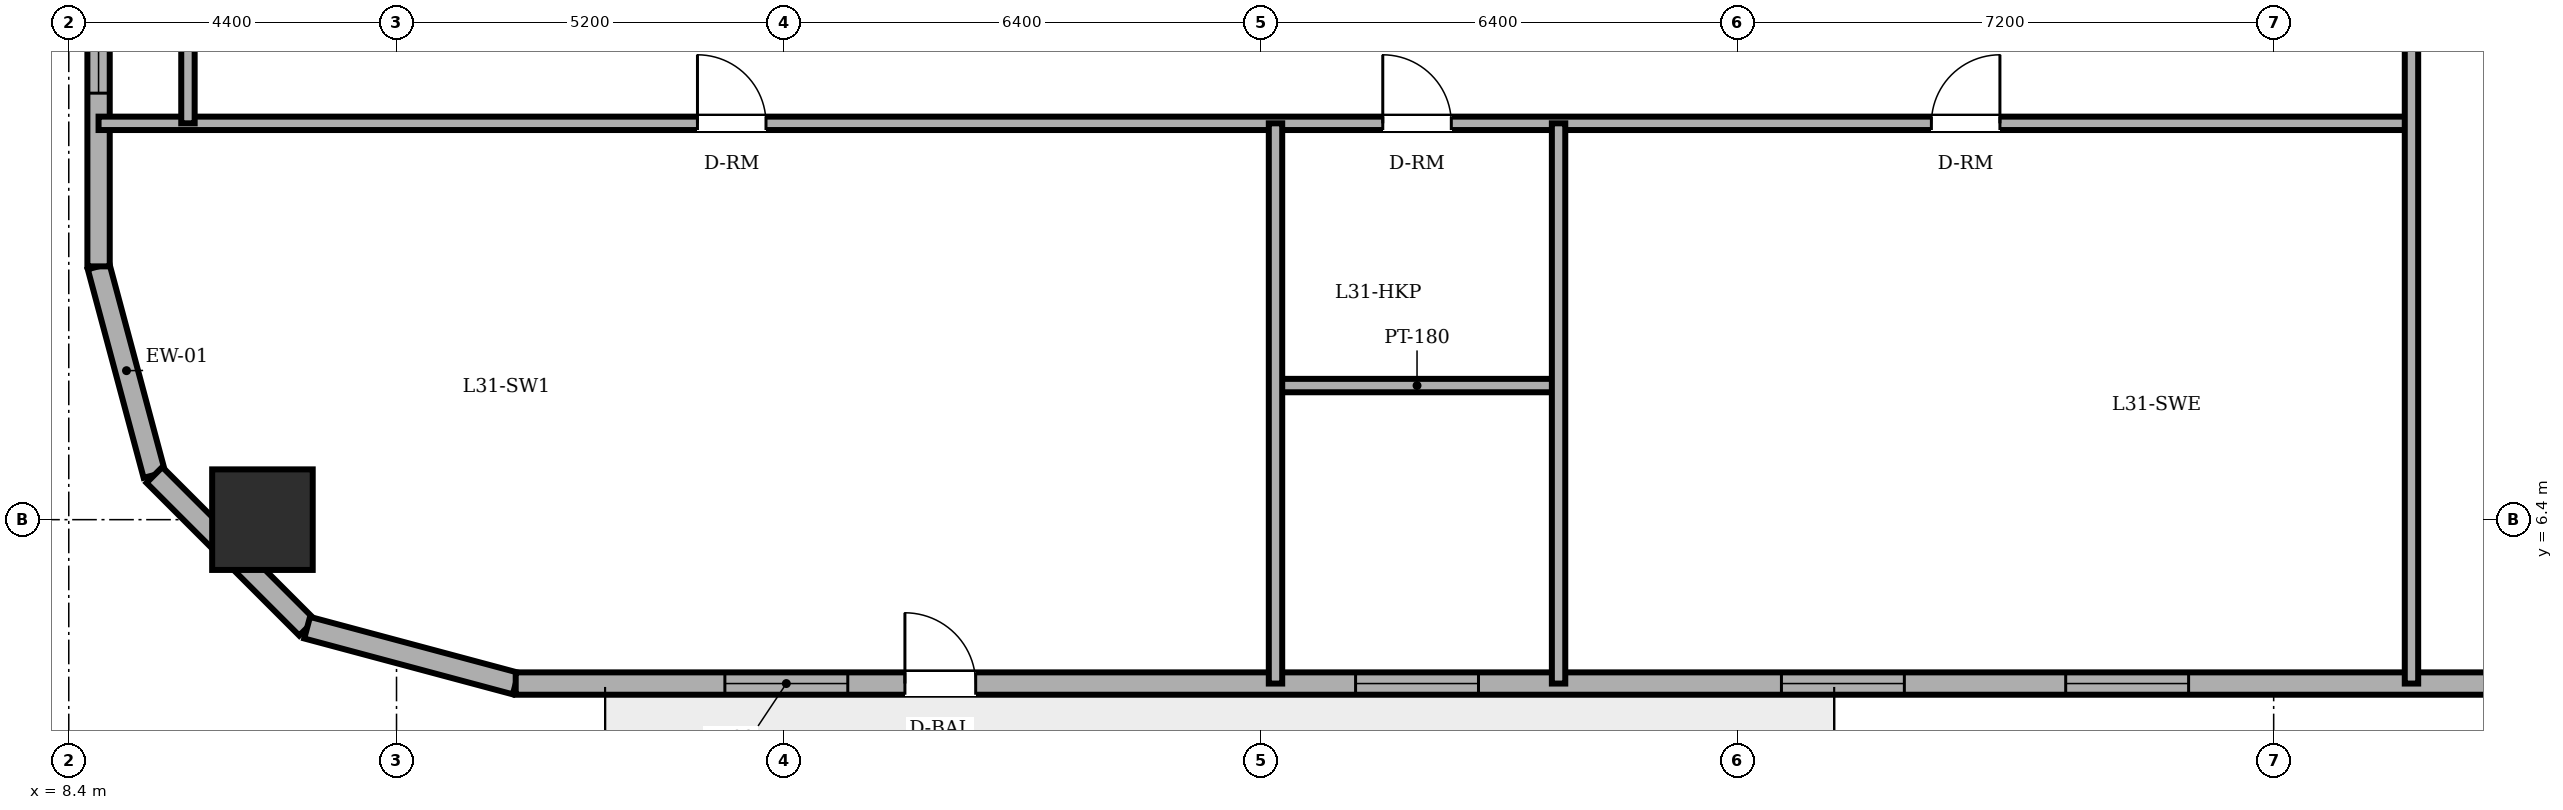
"""IFC4 building model, lengths in metres.
Left out: names, types, materials, properties, quantities, classifications, styles, units other than length and angle.
Written with IfcOpenShell. Run it as: python <this file> out.ifc"""

import sys

from ifc_helpers import new_model, si_unit, direction, frame, frame_2d, origin, origin_2d, place, context, subcontext, project, spatial, rectangle, circle, extrude, element, fill, save


model = new_model("IFC4")
c1 = context("Model", 3, precision=1e-05, world=origin(), true_north=direction((0.0, 1.0)))
c2 = subcontext(c1, "Body", "Model", "MODEL_VIEW")
j1 = project(units=[si_unit("LENGTHUNIT", "METRE"), si_unit("PLANEANGLEUNIT", "RADIAN")], contexts=[c1])
p1 = place(None, origin())
s1 = spatial("IfcSite", under=j1, at=p1, CompositionType="ELEMENT")
p2 = place(p1, origin())
s2 = spatial("IfcBuilding", under=s1, at=p2, CompositionType="ELEMENT")
p3 = place(p2, frame((0.0, 0.0, 118.7)))
s3 = spatial("IfcBuildingStorey", under=s2, at=p3, CompositionType="ELEMENT", Elevation=118.7)
p4 = place(p3, frame((11.0, 6.4, 0.0), z_axis=(0.0, 0.0, 1.0), x_axis=(1.0, 0.0, 0.0)))
e1 = element("IfcColumn", 1, at=p4, inside=s3, PredefinedType="COLUMN", context=c2, shape_type="SweptSolid", body=[
    extrude(circle(Radius=0.675, at=origin_2d()), origin(), (0.0, 0.0, 1.0), 3.6),
])
p5 = place(p3, frame((8.8, 9.8, 0.0), z_axis=(0.0, 0.0, 1.0), x_axis=(0.258731875344, -0.96594917914, 0.0)))
e2 = element("IfcWall", 2, at=p5, inside=s3, PredefinedType="SOLIDWALL", context=c2, shape_type="SweptSolid", body=[
    extrude(rectangle(XDim=2.899, YDim=0.3, at=frame_2d((1.449, 0.0))), origin(), (0.0, 0.0, 1.0), 3.4),
])
p6 = place(p3, frame((9.55, 7.0, 0.0), z_axis=(0.0, 0.0, 1.0), x_axis=(0.707106781187, -0.707106781187, 0.0)))
e3 = element("IfcWall", 3, at=p6, inside=s3, PredefinedType="SOLIDWALL", context=c2, shape_type="SweptSolid", body=[
    extrude(rectangle(XDim=2.899, YDim=0.3, at=frame_2d((1.45, 0.0))), origin(), (0.0, 0.0, 1.0), 3.4),
])
p7 = place(p3, frame((11.6, 4.95, 0.0), z_axis=(0.0, 0.0, 1.0), x_axis=(0.965943540406, -0.258752926066, 0.0)))
e4 = element("IfcWall", 4, at=p7, inside=s3, PredefinedType="SOLIDWALL", context=c2, shape_type="SweptSolid", body=[
    extrude(rectangle(XDim=2.898, YDim=0.3, at=frame_2d((1.449, 0.0))), origin(), (0.0, 0.0, 1.0), 3.4),
])
p8 = place(p3, frame((14.4, 4.2, 0.0), z_axis=(0.0, 0.0, 1.0), x_axis=(1.0, 0.0, 0.0)))
e5 = element("IfcWall", 5, at=p8, inside=s3, PredefinedType="SOLIDWALL", context=c2, shape_type="SweptSolid", body=[
    extrude(rectangle(XDim=29.933, YDim=0.3, at=frame_2d((14.967, 0.0))), origin(), (0.0, 0.0, 1.0), 3.4),
])
p9 = place(p8, frame((5.225, 0.0, 0.0)))
e6 = element("IfcOpeningElement", 6, at=p9, cuts=e5, PredefinedType="OPENING", context=c2, shape_type="SweptSolid", body=[
    extrude(rectangle(XDim=0.95, YDim=2.2, at=frame_2d((0.475, 1.1))), frame((0.0, 0.16, 0.0), z_axis=(0.0, -1.0, 0.0), x_axis=(1.0, 0.0, 0.0)), (0.0, 0.0, 1.0), 0.32),
])
p10 = place(p8, frame((2.808, 0.0, 0.85)))
e7 = element("IfcOpeningElement", 7, at=p10, cuts=e5, PredefinedType="OPENING", context=c2, shape_type="SweptSolid", body=[
    extrude(rectangle(XDim=1.65, YDim=1.55, at=frame_2d((0.825, 0.775))), frame((0.0, 0.16, 0.0), z_axis=(0.0, -1.0, 0.0), x_axis=(1.0, 0.0, 0.0)), (0.0, 0.0, 1.0), 0.32),
])
p11 = place(p8, frame((11.275, 0.0, 0.85)))
e8 = element("IfcOpeningElement", 8, at=p11, cuts=e5, PredefinedType="OPENING", context=c2, shape_type="SweptSolid", body=[
    extrude(rectangle(XDim=1.65, YDim=1.55, at=frame_2d((0.825, 0.775))), frame((0.0, 0.16, 0.0), z_axis=(0.0, -1.0, 0.0), x_axis=(1.0, 0.0, 0.0)), (0.0, 0.0, 1.0), 0.32),
])
p12 = place(p8, frame((16.992, 0.0, 0.85)))
e9 = element("IfcOpeningElement", 9, at=p12, cuts=e5, PredefinedType="OPENING", context=c2, shape_type="SweptSolid", body=[
    extrude(rectangle(XDim=1.65, YDim=1.55, at=frame_2d((0.825, 0.775))), frame((0.0, 0.16, 0.0), z_axis=(0.0, -1.0, 0.0), x_axis=(1.0, 0.0, 0.0)), (0.0, 0.0, 1.0), 0.32),
])
p13 = place(p8, frame((20.808, 0.0, 0.85)))
e10 = element("IfcOpeningElement", 10, at=p13, cuts=e5, PredefinedType="OPENING", context=c2, shape_type="SweptSolid", body=[
    extrude(rectangle(XDim=1.65, YDim=1.55, at=frame_2d((0.825, 0.775))), frame((0.0, 0.16, 0.0), z_axis=(0.0, -1.0, 0.0), x_axis=(1.0, 0.0, 0.0)), (0.0, 0.0, 1.0), 0.32),
])
p14 = place(p8, frame((26.692, 0.0, 0.85)))
e11 = element("IfcOpeningElement", 11, at=p14, cuts=e5, PredefinedType="OPENING", context=c2, shape_type="SweptSolid", body=[
    extrude(rectangle(XDim=1.65, YDim=1.55, at=frame_2d((0.825, 0.775))), frame((0.0, 0.16, 0.0), z_axis=(0.0, -1.0, 0.0), x_axis=(1.0, 0.0, 0.0)), (0.0, 0.0, 1.0), 0.32),
])
p15 = place(p3, frame((8.8, 38.2, 0.0), z_axis=(0.0, 0.0, 1.0), x_axis=(0.0, -1.0, 0.0)))
e12 = element("IfcWall", 12, at=p15, inside=s3, PredefinedType="SOLIDWALL", context=c2, shape_type="SweptSolid", body=[
    extrude(rectangle(XDim=28.4, YDim=0.3, at=frame_2d((14.2, 0.0))), origin(), (0.0, 0.0, 1.0), 3.4),
])
p16 = place(p15, frame((2.325, 0.0, 0.85)))
e13 = element("IfcOpeningElement", 13, at=p16, cuts=e12, PredefinedType="OPENING", context=c2, shape_type="SweptSolid", body=[
    extrude(rectangle(XDim=1.65, YDim=1.55, at=frame_2d((0.825, 0.775))), frame((0.0, 0.16, 0.0), z_axis=(0.0, -1.0, 0.0), x_axis=(1.0, 0.0, 0.0)), (0.0, 0.0, 1.0), 0.32),
])
p17 = place(p15, frame((6.828, 0.0, 0.85)))
e14 = element("IfcOpeningElement", 14, at=p17, cuts=e12, PredefinedType="OPENING", context=c2, shape_type="SweptSolid", body=[
    extrude(rectangle(XDim=1.65, YDim=1.55, at=frame_2d((0.825, 0.775))), frame((0.0, 0.16, 0.0), z_axis=(0.0, -1.0, 0.0), x_axis=(1.0, 0.0, 0.0)), (0.0, 0.0, 1.0), 0.32),
])
p18 = place(p15, frame((10.102, 0.0, 0.85)))
e15 = element("IfcOpeningElement", 15, at=p18, cuts=e12, PredefinedType="OPENING", context=c2, shape_type="SweptSolid", body=[
    extrude(rectangle(XDim=1.65, YDim=1.55, at=frame_2d((0.825, 0.775))), frame((0.0, 0.16, 0.0), z_axis=(0.0, -1.0, 0.0), x_axis=(1.0, 0.0, 0.0)), (0.0, 0.0, 1.0), 0.32),
])
p19 = place(p15, frame((16.648, 0.0, 0.85)))
e16 = element("IfcOpeningElement", 16, at=p19, cuts=e12, PredefinedType="OPENING", context=c2, shape_type="SweptSolid", body=[
    extrude(rectangle(XDim=1.65, YDim=1.55, at=frame_2d((0.825, 0.775))), frame((0.0, 0.16, 0.0), z_axis=(0.0, -1.0, 0.0), x_axis=(1.0, 0.0, 0.0)), (0.0, 0.0, 1.0), 0.32),
])
p20 = place(p15, frame((19.922, 0.0, 0.85)))
e17 = element("IfcOpeningElement", 17, at=p20, cuts=e12, PredefinedType="OPENING", context=c2, shape_type="SweptSolid", body=[
    extrude(rectangle(XDim=1.65, YDim=1.55, at=frame_2d((0.825, 0.775))), frame((0.0, 0.16, 0.0), z_axis=(0.0, -1.0, 0.0), x_axis=(1.0, 0.0, 0.0)), (0.0, 0.0, 1.0), 0.32),
])
p21 = place(p15, frame((24.425, 0.0, 0.85)))
e18 = element("IfcOpeningElement", 18, at=p21, cuts=e12, PredefinedType="OPENING", context=c2, shape_type="SweptSolid", body=[
    extrude(rectangle(XDim=1.65, YDim=1.55, at=frame_2d((0.825, 0.775))), frame((0.0, 0.16, 0.0), z_axis=(0.0, -1.0, 0.0), x_axis=(1.0, 0.0, 0.0)), (0.0, 0.0, 1.0), 0.32),
])
p22 = place(p3, frame((24.6, 8.2, 0.0), z_axis=(0.0, 0.0, 1.0), x_axis=(1.0, 0.0, 0.0)))
e19 = element("IfcWall", 19, at=p22, inside=s3, PredefinedType="PARTITIONING", context=c2, shape_type="SweptSolid", body=[
    extrude(rectangle(XDim=3.8, YDim=0.18, at=frame_2d((1.9, 0.0))), origin(), (0.0, 0.0, 1.0), 3.4),
])
p23 = place(p3, frame((8.8, 11.72, 0.0), z_axis=(0.0, 0.0, 1.0), x_axis=(1.0, 0.0, 0.0)))
e20 = element("IfcWall", 20, at=p23, inside=s3, PredefinedType="PARTITIONING", context=c2, shape_type="SweptSolid", body=[
    extrude(rectangle(XDim=31.05, YDim=0.18, at=frame_2d((15.525, 0.0))), origin(), (0.0, 0.0, 1.0), 3.4),
])
p24 = place(p23, frame((17.24, 0.0, 0.0)))
e21 = element("IfcOpeningElement", 21, at=p24, cuts=e20, PredefinedType="OPENING", context=c2, shape_type="SweptSolid", body=[
    extrude(rectangle(XDim=0.92, YDim=2.1, at=frame_2d((0.46, 1.05))), frame((0.0, 0.1, 0.0), z_axis=(0.0, -1.0, 0.0), x_axis=(1.0, 0.0, 0.0)), (0.0, 0.0, 1.0), 0.2),
])
p25 = place(p23, frame((8.04, 0.0, 0.0)))
e22 = element("IfcOpeningElement", 22, at=p25, cuts=e20, PredefinedType="OPENING", context=c2, shape_type="SweptSolid", body=[
    extrude(rectangle(XDim=0.92, YDim=2.1, at=frame_2d((0.46, 1.05))), frame((0.0, 0.1, 0.0), z_axis=(0.0, -1.0, 0.0), x_axis=(1.0, 0.0, 0.0)), (0.0, 0.0, 1.0), 0.2),
])
p26 = place(p23, frame((24.605, 0.0, 0.0)))
e23 = element("IfcOpeningElement", 23, at=p26, cuts=e20, PredefinedType="OPENING", context=c2, shape_type="SweptSolid", body=[
    extrude(rectangle(XDim=0.92, YDim=2.1, at=frame_2d((0.46, 1.05))), frame((0.0, 0.1, 0.0), z_axis=(0.0, -1.0, 0.0), x_axis=(1.0, 0.0, 0.0)), (0.0, 0.0, 1.0), 0.2),
])
p27 = place(p3, frame((10.0, 11.72, 0.0), z_axis=(0.0, 0.0, 1.0), x_axis=(0.0, 1.0, 0.0)))
e24 = element("IfcWall", 24, at=p27, inside=s3, PredefinedType="PARTITIONING", context=c2, shape_type="SweptSolid", body=[
    extrude(rectangle(XDim=2.46, YDim=0.18, at=frame_2d((1.23, 0.0))), origin(), (0.0, 0.0, 1.0), 3.4),
])
for number, where, z_axis, x_axis in (
    (25, (24.6, 4.2, 0.0), (0.0, 0.0, 1.0), (0.0, 1.0, 0.0)),
    (26, (28.4, 4.2, 0.0), (0.0, 0.0, 1.0), (0.0, 1.0, 0.0)),
):
    element("IfcWall", number, at=place(p3, frame(where, z_axis=z_axis, x_axis=x_axis)), inside=s3, PredefinedType="PARTITIONING", context=c2, shape_type="SweptSolid", body=[
        extrude(rectangle(XDim=7.52, YDim=0.18, at=frame_2d((3.76, 0.0))), origin(), (0.0, 0.0, 1.0), 3.4),
    ])
p28 = place(p3, frame((39.85, 4.2, 0.0), z_axis=(0.0, 0.0, 1.0), x_axis=(0.0, 1.0, 0.0)))
e27 = element("IfcWall", 27, at=p28, inside=s3, PredefinedType="PARTITIONING", context=c2, shape_type="SweptSolid", body=[
    extrude(rectangle(XDim=18.62, YDim=0.18, at=frame_2d((9.31, 0.0))), origin(), (0.0, 0.0, 1.0), 3.4),
])
p29 = place(p28, frame((12.35, 0.0, 0.0)))
e28 = element("IfcOpeningElement", 28, at=p29, cuts=e27, PredefinedType="OPENING", context=c2, shape_type="SweptSolid", body=[
    extrude(rectangle(XDim=0.92, YDim=2.1, at=frame_2d((0.46, 1.05))), frame((0.0, 0.1, 0.0), z_axis=(0.0, -1.0, 0.0), x_axis=(1.0, 0.0, 0.0)), (0.0, 0.0, 1.0), 0.2),
])
p30 = place(p9, origin())
e29 = element("IfcDoor", 29, at=p30, inside=s3, OperationType="SINGLE_SWING_LEFT", PredefinedType="DOOR", context=c2, shape_type="SweptSolid", body=[
    extrude(rectangle(XDim=0.95, YDim=2.2, at=frame_2d((0.475, 1.1))), frame((0.0, 0.025, 0.0), z_axis=(0.0, -1.0, 0.0), x_axis=(1.0, 0.0, 0.0)), (0.0, 0.0, 1.0), 0.05),
])
fill(e6, e29)
p31 = place(p10, origin())
e30 = element("IfcWindow", 30, at=p31, inside=s3, PartitioningType="DOUBLE_PANEL_VERTICAL", PredefinedType="WINDOW", context=c2, shape_type="SweptSolid", body=[
    extrude(rectangle(XDim=1.65, YDim=1.55, at=frame_2d((0.825, 0.775))), frame((0.0, 0.03, 0.0), z_axis=(0.0, -1.0, 0.0), x_axis=(1.0, 0.0, 0.0)), (0.0, 0.0, 1.0), 0.06),
])
fill(e7, e30)
p32 = place(p11, origin())
e31 = element("IfcWindow", 31, at=p32, inside=s3, PartitioningType="DOUBLE_PANEL_VERTICAL", PredefinedType="WINDOW", context=c2, shape_type="SweptSolid", body=[
    extrude(rectangle(XDim=1.65, YDim=1.55, at=frame_2d((0.825, 0.775))), frame((0.0, 0.03, 0.0), z_axis=(0.0, -1.0, 0.0), x_axis=(1.0, 0.0, 0.0)), (0.0, 0.0, 1.0), 0.06),
])
fill(e8, e31)
p33 = place(p12, origin())
e32 = element("IfcWindow", 32, at=p33, inside=s3, PartitioningType="DOUBLE_PANEL_VERTICAL", PredefinedType="WINDOW", context=c2, shape_type="SweptSolid", body=[
    extrude(rectangle(XDim=1.65, YDim=1.55, at=frame_2d((0.825, 0.775))), frame((0.0, 0.03, 0.0), z_axis=(0.0, -1.0, 0.0), x_axis=(1.0, 0.0, 0.0)), (0.0, 0.0, 1.0), 0.06),
])
fill(e9, e32)
p34 = place(p13, origin())
e33 = element("IfcWindow", 33, at=p34, inside=s3, PartitioningType="DOUBLE_PANEL_VERTICAL", PredefinedType="WINDOW", context=c2, shape_type="SweptSolid", body=[
    extrude(rectangle(XDim=1.65, YDim=1.55, at=frame_2d((0.825, 0.775))), frame((0.0, 0.03, 0.0), z_axis=(0.0, -1.0, 0.0), x_axis=(1.0, 0.0, 0.0)), (0.0, 0.0, 1.0), 0.06),
])
fill(e10, e33)
p35 = place(p21, origin())
e34 = element("IfcWindow", 34, at=p35, inside=s3, PartitioningType="DOUBLE_PANEL_VERTICAL", PredefinedType="WINDOW", context=c2, shape_type="SweptSolid", body=[
    extrude(rectangle(XDim=1.65, YDim=1.55, at=frame_2d((0.825, 0.775))), frame((0.0, 0.03, 0.0), z_axis=(0.0, -1.0, 0.0), x_axis=(1.0, 0.0, 0.0)), (0.0, 0.0, 1.0), 0.06),
])
fill(e18, e34)
p36 = place(p24, origin())
e35 = element("IfcDoor", 35, at=p36, inside=s3, OperationType="SINGLE_SWING_LEFT", PredefinedType="DOOR", context=c2, shape_type="SweptSolid", body=[
    extrude(rectangle(XDim=0.92, YDim=2.1, at=frame_2d((0.46, 1.05))), frame((0.0, 0.025, 0.0), z_axis=(0.0, -1.0, 0.0), x_axis=(1.0, 0.0, 0.0)), (0.0, 0.0, 1.0), 0.05),
])
fill(e21, e35)
p37 = place(p25, origin())
e36 = element("IfcDoor", 36, at=p37, inside=s3, OperationType="SINGLE_SWING_LEFT", PredefinedType="DOOR", context=c2, shape_type="SweptSolid", body=[
    extrude(rectangle(XDim=0.92, YDim=2.1, at=frame_2d((0.46, 1.05))), frame((0.0, 0.025, 0.0), z_axis=(0.0, -1.0, 0.0), x_axis=(1.0, 0.0, 0.0)), (0.0, 0.0, 1.0), 0.05),
])
fill(e22, e36)
p38 = place(p26, origin())
e37 = element("IfcDoor", 37, at=p38, inside=s3, OperationType="SINGLE_SWING_RIGHT", PredefinedType="DOOR", context=c2, shape_type="SweptSolid", body=[
    extrude(rectangle(XDim=0.92, YDim=2.1, at=frame_2d((0.46, 1.05))), frame((0.0, 0.025, 0.0), z_axis=(0.0, -1.0, 0.0), x_axis=(1.0, 0.0, 0.0)), (0.0, 0.0, 1.0), 0.05),
])
fill(e23, e37)
save(model, sys.argv[1])
